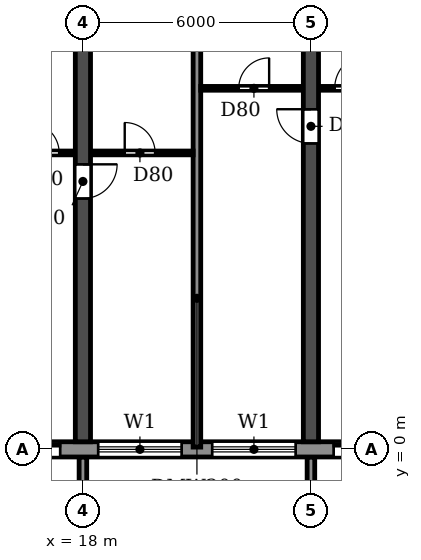
"""IFC4 building model, lengths in metres.
Left out: names, types, materials, properties, quantities, classifications, styles, units other than length and angle.
Written with IfcOpenShell. Run it as: python <this file> out.ifc"""

import sys

from ifc_helpers import new_model, si_unit, direction, frame, frame_2d, origin, place, context, subcontext, project, spatial, polyline, rectangle, outline, extrude, source, transform, mapped, element, fill, save


model = new_model("IFC4")
c1 = context("Model", 3, precision=1e-05, world=origin(), true_north=direction((0.0, 1.0)))
c2 = subcontext(c1, "Body", "Model", "MODEL_VIEW")
j1 = project(units=[si_unit("LENGTHUNIT", "METRE"), si_unit("PLANEANGLEUNIT", "RADIAN")], contexts=[c1])
p1 = place(None, origin())
s1 = spatial("IfcSite", under=j1, at=p1, CompositionType="ELEMENT")
p2 = place(p1, origin())
s2 = spatial("IfcBuilding", under=s1, at=p2, CompositionType="ELEMENT")
p3 = place(p2, frame((0.0, 0.0, 43.2)))
s3 = spatial("IfcBuildingStorey", under=s2, at=p3, CompositionType="ELEMENT", Elevation=43.2)
p4 = place(p3, frame((18.0, 0.2, 0.0), z_axis=(0.0, 0.0, 1.0), x_axis=(0.0, 1.0, 0.0)))
e1 = element("IfcWall", 1, at=p4, inside=s3, PredefinedType="SHEAR", context=c2, shape_type="SweptSolid", body=[
    extrude(rectangle(XDim=11.65, YDim=0.4, at=frame_2d((5.825, 0.0))), origin(), (0.0, 0.0, 1.0), 3.05),
])
p5 = place(p4, frame((6.4, 0.0, 0.0)))
e2 = element("IfcOpeningElement", 2, at=p5, cuts=e1, PredefinedType="OPENING", context=c2, shape_type="SweptSolid", body=[
    extrude(rectangle(XDim=0.9, YDim=2.1, at=frame_2d((0.45, 1.05))), frame((0.0, 0.21, 0.0), z_axis=(0.0, -1.0, 0.0), x_axis=(1.0, 0.0, 0.0)), (0.0, 0.0, 1.0), 0.42),
])
p6 = place(p3, frame((24.0, 0.2, 0.0), z_axis=(0.0, 0.0, 1.0), x_axis=(0.0, 1.0, 0.0)))
e3 = element("IfcWall", 3, at=p6, inside=s3, PredefinedType="SHEAR", context=c2, shape_type="SweptSolid", body=[
    extrude(rectangle(XDim=11.65, YDim=0.4, at=frame_2d((5.825, 0.0))), origin(), (0.0, 0.0, 1.0), 3.05),
])
p7 = place(p6, frame((7.85, 0.0, 0.0)))
e4 = element("IfcOpeningElement", 4, at=p7, cuts=e3, PredefinedType="OPENING", context=c2, shape_type="SweptSolid", body=[
    extrude(rectangle(XDim=0.9, YDim=2.1, at=frame_2d((0.45, 1.05))), frame((0.0, 0.21, 0.0), z_axis=(0.0, -1.0, 0.0), x_axis=(1.0, 0.0, 0.0)), (0.0, 0.0, 1.0), 0.42),
])
p8 = place(p3, frame((4.683, 0.0, 0.0), z_axis=(0.0, 0.0, 1.0), x_axis=(1.0, 0.0, 0.0)))
e5 = element("IfcWall", 5, at=p8, inside=s3, PredefinedType="STANDARD", context=c2, shape_type="SweptSolid", body=[
    extrude(rectangle(XDim=92.634, YDim=0.4, at=frame_2d((46.317, 0.0))), origin(), (0.0, 0.0, 1.0), 3.05),
])
p9 = place(p8, frame((1.717, 0.0, 0.9)))
e6 = element("IfcOpeningElement", 6, at=p9, cuts=e5, PredefinedType="OPENING", context=c2, shape_type="SweptSolid", body=[
    extrude(rectangle(XDim=2.2, YDim=1.5, at=frame_2d((1.1, 0.75))), frame((0.0, 0.21, 0.0), z_axis=(0.0, -1.0, 0.0), x_axis=(1.0, 0.0, 0.0)), (0.0, 0.0, 1.0), 0.42),
])
p10 = place(p8, frame((4.717, 0.0, 0.9)))
e7 = element("IfcOpeningElement", 7, at=p10, cuts=e5, PredefinedType="OPENING", context=c2, shape_type="SweptSolid", body=[
    extrude(rectangle(XDim=2.2, YDim=1.5, at=frame_2d((1.1, 0.75))), frame((0.0, 0.21, 0.0), z_axis=(0.0, -1.0, 0.0), x_axis=(1.0, 0.0, 0.0)), (0.0, 0.0, 1.0), 0.42),
])
p11 = place(p8, frame((7.717, 0.0, 0.9)))
e8 = element("IfcOpeningElement", 8, at=p11, cuts=e5, PredefinedType="OPENING", context=c2, shape_type="SweptSolid", body=[
    extrude(rectangle(XDim=2.2, YDim=1.5, at=frame_2d((1.1, 0.75))), frame((0.0, 0.21, 0.0), z_axis=(0.0, -1.0, 0.0), x_axis=(1.0, 0.0, 0.0)), (0.0, 0.0, 1.0), 0.42),
])
p12 = place(p8, frame((10.917, 0.0, 0.0)))
e9 = element("IfcOpeningElement", 9, at=p12, cuts=e5, PredefinedType="OPENING", context=c2, shape_type="SweptSolid", body=[
    extrude(rectangle(XDim=1.8, YDim=2.4, at=frame_2d((0.9, 1.2))), frame((0.0, 0.21, 0.0), z_axis=(0.0, -1.0, 0.0), x_axis=(1.0, 0.0, 0.0)), (0.0, 0.0, 1.0), 0.42),
])
p13 = place(p8, frame((13.717, 0.0, 0.9)))
e10 = element("IfcOpeningElement", 10, at=p13, cuts=e5, PredefinedType="OPENING", context=c2, shape_type="SweptSolid", body=[
    extrude(rectangle(XDim=2.2, YDim=1.5, at=frame_2d((1.1, 0.75))), frame((0.0, 0.21, 0.0), z_axis=(0.0, -1.0, 0.0), x_axis=(1.0, 0.0, 0.0)), (0.0, 0.0, 1.0), 0.42),
])
p14 = place(p8, frame((16.717, 0.0, 0.9)))
e11 = element("IfcOpeningElement", 11, at=p14, cuts=e5, PredefinedType="OPENING", context=c2, shape_type="SweptSolid", body=[
    extrude(rectangle(XDim=2.2, YDim=1.5, at=frame_2d((1.1, 0.75))), frame((0.0, 0.21, 0.0), z_axis=(0.0, -1.0, 0.0), x_axis=(1.0, 0.0, 0.0)), (0.0, 0.0, 1.0), 0.42),
])
p15 = place(p8, frame((19.917, 0.0, 0.0)))
e12 = element("IfcOpeningElement", 12, at=p15, cuts=e5, PredefinedType="OPENING", context=c2, shape_type="SweptSolid", body=[
    extrude(rectangle(XDim=1.8, YDim=2.4, at=frame_2d((0.9, 1.2))), frame((0.0, 0.21, 0.0), z_axis=(0.0, -1.0, 0.0), x_axis=(1.0, 0.0, 0.0)), (0.0, 0.0, 1.0), 0.42),
])
p16 = place(p8, frame((22.717, 0.0, 0.9)))
e13 = element("IfcOpeningElement", 13, at=p16, cuts=e5, PredefinedType="OPENING", context=c2, shape_type="SweptSolid", body=[
    extrude(rectangle(XDim=2.2, YDim=1.5, at=frame_2d((1.1, 0.75))), frame((0.0, 0.21, 0.0), z_axis=(0.0, -1.0, 0.0), x_axis=(1.0, 0.0, 0.0)), (0.0, 0.0, 1.0), 0.42),
])
p17 = place(p8, frame((25.717, 0.0, 0.9)))
e14 = element("IfcOpeningElement", 14, at=p17, cuts=e5, PredefinedType="OPENING", context=c2, shape_type="SweptSolid", body=[
    extrude(rectangle(XDim=2.2, YDim=1.5, at=frame_2d((1.1, 0.75))), frame((0.0, 0.21, 0.0), z_axis=(0.0, -1.0, 0.0), x_axis=(1.0, 0.0, 0.0)), (0.0, 0.0, 1.0), 0.42),
])
p18 = place(p8, frame((28.717, 0.0, 0.9)))
e15 = element("IfcOpeningElement", 15, at=p18, cuts=e5, PredefinedType="OPENING", context=c2, shape_type="SweptSolid", body=[
    extrude(rectangle(XDim=2.2, YDim=1.5, at=frame_2d((1.1, 0.75))), frame((0.0, 0.21, 0.0), z_axis=(0.0, -1.0, 0.0), x_axis=(1.0, 0.0, 0.0)), (0.0, 0.0, 1.0), 0.42),
])
p19 = place(p8, frame((31.717, 0.0, 0.9)))
e16 = element("IfcOpeningElement", 16, at=p19, cuts=e5, PredefinedType="OPENING", context=c2, shape_type="SweptSolid", body=[
    extrude(rectangle(XDim=2.2, YDim=1.5, at=frame_2d((1.1, 0.75))), frame((0.0, 0.21, 0.0), z_axis=(0.0, -1.0, 0.0), x_axis=(1.0, 0.0, 0.0)), (0.0, 0.0, 1.0), 0.42),
])
p20 = place(p8, frame((34.917, 0.0, 0.0)))
e17 = element("IfcOpeningElement", 17, at=p20, cuts=e5, PredefinedType="OPENING", context=c2, shape_type="SweptSolid", body=[
    extrude(rectangle(XDim=1.8, YDim=2.4, at=frame_2d((0.9, 1.2))), frame((0.0, 0.21, 0.0), z_axis=(0.0, -1.0, 0.0), x_axis=(1.0, 0.0, 0.0)), (0.0, 0.0, 1.0), 0.42),
])
p21 = place(p8, frame((37.717, 0.0, 0.9)))
e18 = element("IfcOpeningElement", 18, at=p21, cuts=e5, PredefinedType="OPENING", context=c2, shape_type="SweptSolid", body=[
    extrude(rectangle(XDim=2.2, YDim=1.5, at=frame_2d((1.1, 0.75))), frame((0.0, 0.21, 0.0), z_axis=(0.0, -1.0, 0.0), x_axis=(1.0, 0.0, 0.0)), (0.0, 0.0, 1.0), 0.42),
])
p22 = place(p8, frame((40.717, 0.0, 0.9)))
e19 = element("IfcOpeningElement", 19, at=p22, cuts=e5, PredefinedType="OPENING", context=c2, shape_type="SweptSolid", body=[
    extrude(rectangle(XDim=2.2, YDim=1.5, at=frame_2d((1.1, 0.75))), frame((0.0, 0.21, 0.0), z_axis=(0.0, -1.0, 0.0), x_axis=(1.0, 0.0, 0.0)), (0.0, 0.0, 1.0), 0.42),
])
p23 = place(p8, frame((43.717, 0.0, 0.9)))
e20 = element("IfcOpeningElement", 20, at=p23, cuts=e5, PredefinedType="OPENING", context=c2, shape_type="SweptSolid", body=[
    extrude(rectangle(XDim=2.2, YDim=1.5, at=frame_2d((1.1, 0.75))), frame((0.0, 0.21, 0.0), z_axis=(0.0, -1.0, 0.0), x_axis=(1.0, 0.0, 0.0)), (0.0, 0.0, 1.0), 0.42),
])
p24 = place(p8, frame((46.917, 0.0, 0.0)))
e21 = element("IfcOpeningElement", 21, at=p24, cuts=e5, PredefinedType="OPENING", context=c2, shape_type="SweptSolid", body=[
    extrude(rectangle(XDim=1.8, YDim=2.4, at=frame_2d((0.9, 1.2))), frame((0.0, 0.21, 0.0), z_axis=(0.0, -1.0, 0.0), x_axis=(1.0, 0.0, 0.0)), (0.0, 0.0, 1.0), 0.42),
])
p25 = place(p8, frame((49.717, 0.0, 0.9)))
e22 = element("IfcOpeningElement", 22, at=p25, cuts=e5, PredefinedType="OPENING", context=c2, shape_type="SweptSolid", body=[
    extrude(rectangle(XDim=2.2, YDim=1.5, at=frame_2d((1.1, 0.75))), frame((0.0, 0.21, 0.0), z_axis=(0.0, -1.0, 0.0), x_axis=(1.0, 0.0, 0.0)), (0.0, 0.0, 1.0), 0.42),
])
p26 = place(p8, frame((52.717, 0.0, 0.9)))
e23 = element("IfcOpeningElement", 23, at=p26, cuts=e5, PredefinedType="OPENING", context=c2, shape_type="SweptSolid", body=[
    extrude(rectangle(XDim=2.2, YDim=1.5, at=frame_2d((1.1, 0.75))), frame((0.0, 0.21, 0.0), z_axis=(0.0, -1.0, 0.0), x_axis=(1.0, 0.0, 0.0)), (0.0, 0.0, 1.0), 0.42),
])
p27 = place(p8, frame((55.717, 0.0, 0.9)))
e24 = element("IfcOpeningElement", 24, at=p27, cuts=e5, PredefinedType="OPENING", context=c2, shape_type="SweptSolid", body=[
    extrude(rectangle(XDim=2.2, YDim=1.5, at=frame_2d((1.1, 0.75))), frame((0.0, 0.21, 0.0), z_axis=(0.0, -1.0, 0.0), x_axis=(1.0, 0.0, 0.0)), (0.0, 0.0, 1.0), 0.42),
])
p28 = place(p8, frame((58.917, 0.0, 0.0)))
e25 = element("IfcOpeningElement", 25, at=p28, cuts=e5, PredefinedType="OPENING", context=c2, shape_type="SweptSolid", body=[
    extrude(rectangle(XDim=1.8, YDim=2.4, at=frame_2d((0.9, 1.2))), frame((0.0, 0.21, 0.0), z_axis=(0.0, -1.0, 0.0), x_axis=(1.0, 0.0, 0.0)), (0.0, 0.0, 1.0), 0.42),
])
p29 = place(p8, frame((61.717, 0.0, 0.9)))
e26 = element("IfcOpeningElement", 26, at=p29, cuts=e5, PredefinedType="OPENING", context=c2, shape_type="SweptSolid", body=[
    extrude(rectangle(XDim=2.2, YDim=1.5, at=frame_2d((1.1, 0.75))), frame((0.0, 0.21, 0.0), z_axis=(0.0, -1.0, 0.0), x_axis=(1.0, 0.0, 0.0)), (0.0, 0.0, 1.0), 0.42),
])
p30 = place(p8, frame((64.717, 0.0, 0.9)))
e27 = element("IfcOpeningElement", 27, at=p30, cuts=e5, PredefinedType="OPENING", context=c2, shape_type="SweptSolid", body=[
    extrude(rectangle(XDim=2.2, YDim=1.5, at=frame_2d((1.1, 0.75))), frame((0.0, 0.21, 0.0), z_axis=(0.0, -1.0, 0.0), x_axis=(1.0, 0.0, 0.0)), (0.0, 0.0, 1.0), 0.42),
])
p31 = place(p8, frame((67.717, 0.0, 0.9)))
e28 = element("IfcOpeningElement", 28, at=p31, cuts=e5, PredefinedType="OPENING", context=c2, shape_type="SweptSolid", body=[
    extrude(rectangle(XDim=2.2, YDim=1.5, at=frame_2d((1.1, 0.75))), frame((0.0, 0.21, 0.0), z_axis=(0.0, -1.0, 0.0), x_axis=(1.0, 0.0, 0.0)), (0.0, 0.0, 1.0), 0.42),
])
p32 = place(p8, frame((70.917, 0.0, 0.0)))
e29 = element("IfcOpeningElement", 29, at=p32, cuts=e5, PredefinedType="OPENING", context=c2, shape_type="SweptSolid", body=[
    extrude(rectangle(XDim=1.8, YDim=2.4, at=frame_2d((0.9, 1.2))), frame((0.0, 0.21, 0.0), z_axis=(0.0, -1.0, 0.0), x_axis=(1.0, 0.0, 0.0)), (0.0, 0.0, 1.0), 0.42),
])
p33 = place(p8, frame((73.717, 0.0, 0.9)))
e30 = element("IfcOpeningElement", 30, at=p33, cuts=e5, PredefinedType="OPENING", context=c2, shape_type="SweptSolid", body=[
    extrude(rectangle(XDim=2.2, YDim=1.5, at=frame_2d((1.1, 0.75))), frame((0.0, 0.21, 0.0), z_axis=(0.0, -1.0, 0.0), x_axis=(1.0, 0.0, 0.0)), (0.0, 0.0, 1.0), 0.42),
])
p34 = place(p8, frame((76.717, 0.0, 0.9)))
e31 = element("IfcOpeningElement", 31, at=p34, cuts=e5, PredefinedType="OPENING", context=c2, shape_type="SweptSolid", body=[
    extrude(rectangle(XDim=2.2, YDim=1.5, at=frame_2d((1.1, 0.75))), frame((0.0, 0.21, 0.0), z_axis=(0.0, -1.0, 0.0), x_axis=(1.0, 0.0, 0.0)), (0.0, 0.0, 1.0), 0.42),
])
p35 = place(p8, frame((79.717, 0.0, 0.9)))
e32 = element("IfcOpeningElement", 32, at=p35, cuts=e5, PredefinedType="OPENING", context=c2, shape_type="SweptSolid", body=[
    extrude(rectangle(XDim=2.2, YDim=1.5, at=frame_2d((1.1, 0.75))), frame((0.0, 0.21, 0.0), z_axis=(0.0, -1.0, 0.0), x_axis=(1.0, 0.0, 0.0)), (0.0, 0.0, 1.0), 0.42),
])
p36 = place(p8, frame((82.917, 0.0, 0.0)))
e33 = element("IfcOpeningElement", 33, at=p36, cuts=e5, PredefinedType="OPENING", context=c2, shape_type="SweptSolid", body=[
    extrude(rectangle(XDim=1.8, YDim=2.4, at=frame_2d((0.9, 1.2))), frame((0.0, 0.21, 0.0), z_axis=(0.0, -1.0, 0.0), x_axis=(1.0, 0.0, 0.0)), (0.0, 0.0, 1.0), 0.42),
])
p37 = place(p8, frame((85.717, 0.0, 0.9)))
e34 = element("IfcOpeningElement", 34, at=p37, cuts=e5, PredefinedType="OPENING", context=c2, shape_type="SweptSolid", body=[
    extrude(rectangle(XDim=2.2, YDim=1.5, at=frame_2d((1.1, 0.75))), frame((0.0, 0.21, 0.0), z_axis=(0.0, -1.0, 0.0), x_axis=(1.0, 0.0, 0.0)), (0.0, 0.0, 1.0), 0.42),
])
p38 = place(p8, frame((88.717, 0.0, 0.9)))
e35 = element("IfcOpeningElement", 35, at=p38, cuts=e5, PredefinedType="OPENING", context=c2, shape_type="SweptSolid", body=[
    extrude(rectangle(XDim=2.2, YDim=1.5, at=frame_2d((1.1, 0.75))), frame((0.0, 0.21, 0.0), z_axis=(0.0, -1.0, 0.0), x_axis=(1.0, 0.0, 0.0)), (0.0, 0.0, 1.0), 0.42),
])
m1 = source(origin(), c2, "Body", "SweptSolid", [
    extrude(outline(polyline([(0.0, 0.0), (0.2, 0.0), (0.2, 1.65), (0.0, 1.65), (0.0, 0.0)])), origin(), (0.0, 0.0, 1.0), 3.1),
])
for number, where in (
    (36, (17.9, -1.85, 0.0)),
    (37, (23.9, -1.85, 0.0)),
):
    element("IfcWall", number, at=place(p3, frame(where)), inside=s3, PredefinedType="STANDARD", context=c2, shape_type="MappedRepresentation", body=[
        mapped(m1, transform((0.0, 0.0, 0.0))),
    ])
p39 = place(p3, frame((21.0, 0.06, 0.0), z_axis=(0.0, 0.0, 1.0), x_axis=(0.0, 1.0, 0.0)))
e38 = element("IfcWall", 38, at=p39, inside=s3, PredefinedType="PARTITIONING", context=c2, shape_type="SweptSolid", body=[
    extrude(rectangle(XDim=11.78, YDim=0.2, at=frame_2d((5.89, 0.0))), origin(), (0.0, 0.0, 1.0), 3.05),
])
p40 = place(p3, frame((15.9, 7.8, 0.0), z_axis=(0.0, 0.0, 1.0), x_axis=(1.0, 0.0, 0.0)))
e39 = element("IfcWall", 39, at=p40, inside=s3, PredefinedType="PARTITIONING", context=c2, shape_type="SweptSolid", body=[
    extrude(rectangle(XDim=1.89, YDim=0.1, at=frame_2d((0.945, 0.0))), origin(), (0.0, 0.0, 1.0), 3.05),
])
p41 = place(p40, frame((0.675, 0.0, 0.0)))
e40 = element("IfcOpeningElement", 40, at=p41, cuts=e39, PredefinedType="OPENING", context=c2, shape_type="SweptSolid", body=[
    extrude(rectangle(XDim=0.8, YDim=2.1, at=frame_2d((0.4, 1.05))), frame((0.0, 0.06, 0.0), z_axis=(0.0, -1.0, 0.0), x_axis=(1.0, 0.0, 0.0)), (0.0, 0.0, 1.0), 0.12),
])
p42 = place(p3, frame((18.21, 7.8, 0.0), z_axis=(0.0, 0.0, 1.0), x_axis=(1.0, 0.0, 0.0)))
e41 = element("IfcWall", 41, at=p42, inside=s3, PredefinedType="PARTITIONING", context=c2, shape_type="SweptSolid", body=[
    extrude(rectangle(XDim=2.69, YDim=0.1, at=frame_2d((1.345, 0.0))), origin(), (0.0, 0.0, 1.0), 3.05),
])
p43 = place(p42, frame((0.89, 0.0, 0.0)))
e42 = element("IfcOpeningElement", 42, at=p43, cuts=e41, PredefinedType="OPENING", context=c2, shape_type="SweptSolid", body=[
    extrude(rectangle(XDim=0.8, YDim=2.1, at=frame_2d((0.4, 1.05))), frame((0.0, 0.06, 0.0), z_axis=(0.0, -1.0, 0.0), x_axis=(1.0, 0.0, 0.0)), (0.0, 0.0, 1.0), 0.12),
])
p44 = place(p3, frame((21.1, 9.5, 0.0), z_axis=(0.0, 0.0, 1.0), x_axis=(1.0, 0.0, 0.0)))
e43 = element("IfcWall", 43, at=p44, inside=s3, PredefinedType="PARTITIONING", context=c2, shape_type="SweptSolid", body=[
    extrude(rectangle(XDim=2.69, YDim=0.1, at=frame_2d((1.345, 0.0))), origin(), (0.0, 0.0, 1.0), 3.05),
])
p45 = place(p44, frame((1.0, 0.0, 0.0)))
e44 = element("IfcOpeningElement", 44, at=p45, cuts=e43, PredefinedType="OPENING", context=c2, shape_type="SweptSolid", body=[
    extrude(rectangle(XDim=0.8, YDim=2.1, at=frame_2d((0.4, 1.05))), frame((0.0, 0.06, 0.0), z_axis=(0.0, -1.0, 0.0), x_axis=(1.0, 0.0, 0.0)), (0.0, 0.0, 1.0), 0.12),
])
p46 = place(p3, frame((24.21, 9.5, 0.0), z_axis=(0.0, 0.0, 1.0), x_axis=(1.0, 0.0, 0.0)))
e45 = element("IfcWall", 45, at=p46, inside=s3, PredefinedType="PARTITIONING", context=c2, shape_type="SweptSolid", body=[
    extrude(rectangle(XDim=1.99, YDim=0.1, at=frame_2d((0.995, 0.0))), origin(), (0.0, 0.0, 1.0), 3.05),
])
p47 = place(p46, frame((0.415, 0.0, 0.0)))
e46 = element("IfcOpeningElement", 46, at=p47, cuts=e45, PredefinedType="OPENING", context=c2, shape_type="SweptSolid", body=[
    extrude(rectangle(XDim=0.9, YDim=2.1, at=frame_2d((0.45, 1.05))), frame((0.0, 0.06, 0.0), z_axis=(0.0, -1.0, 0.0), x_axis=(1.0, 0.0, 0.0)), (0.0, 0.0, 1.0), 0.12),
])
p48 = place(p12, origin())
e47 = element("IfcDoor", 47, at=p48, inside=s3, OperationType="DOUBLE_DOOR_SLIDING", PredefinedType="DOOR", context=c2, shape_type="SweptSolid", body=[
    extrude(rectangle(XDim=1.8, YDim=2.4, at=frame_2d((0.9, 1.2))), frame((0.0, 0.025, 0.0), z_axis=(0.0, -1.0, 0.0), x_axis=(1.0, 0.0, 0.0)), (0.0, 0.0, 1.0), 0.05),
])
fill(e9, e47)
p49 = place(p13, origin())
e48 = element("IfcWindow", 48, at=p49, inside=s3, PartitioningType="DOUBLE_PANEL_HORIZONTAL", PredefinedType="WINDOW", context=c2, shape_type="SweptSolid", body=[
    extrude(rectangle(XDim=2.2, YDim=1.5, at=frame_2d((1.1, 0.75))), frame((0.0, 0.03, 0.0), z_axis=(0.0, -1.0, 0.0), x_axis=(1.0, 0.0, 0.0)), (0.0, 0.0, 1.0), 0.06),
])
fill(e10, e48)
p50 = place(p14, origin())
e49 = element("IfcWindow", 49, at=p50, inside=s3, PartitioningType="DOUBLE_PANEL_HORIZONTAL", PredefinedType="WINDOW", context=c2, shape_type="SweptSolid", body=[
    extrude(rectangle(XDim=2.2, YDim=1.5, at=frame_2d((1.1, 0.75))), frame((0.0, 0.03, 0.0), z_axis=(0.0, -1.0, 0.0), x_axis=(1.0, 0.0, 0.0)), (0.0, 0.0, 1.0), 0.06),
])
fill(e11, e49)
p51 = place(p15, origin())
e50 = element("IfcDoor", 50, at=p51, inside=s3, OperationType="DOUBLE_DOOR_SLIDING", PredefinedType="DOOR", context=c2, shape_type="SweptSolid", body=[
    extrude(rectangle(XDim=1.8, YDim=2.4, at=frame_2d((0.9, 1.2))), frame((0.0, 0.025, 0.0), z_axis=(0.0, -1.0, 0.0), x_axis=(1.0, 0.0, 0.0)), (0.0, 0.0, 1.0), 0.05),
])
fill(e12, e50)
p52 = place(p43, origin())
e51 = element("IfcDoor", 51, at=p52, inside=s3, OperationType="SINGLE_SWING_LEFT", PredefinedType="DOOR", context=c2, shape_type="SweptSolid", body=[
    extrude(rectangle(XDim=0.8, YDim=2.1, at=frame_2d((0.4, 1.05))), frame((0.0, 0.025, 0.0), z_axis=(0.0, -1.0, 0.0), x_axis=(1.0, 0.0, 0.0)), (0.0, 0.0, 1.0), 0.05),
])
fill(e42, e51)
p53 = place(p41, origin())
e52 = element("IfcDoor", 52, at=p53, inside=s3, OperationType="SINGLE_SWING_LEFT", PredefinedType="DOOR", context=c2, shape_type="SweptSolid", body=[
    extrude(rectangle(XDim=0.8, YDim=2.1, at=frame_2d((0.4, 1.05))), frame((0.0, 0.025, 0.0), z_axis=(0.0, -1.0, 0.0), x_axis=(1.0, 0.0, 0.0)), (0.0, 0.0, 1.0), 0.05),
])
fill(e40, e52)
p54 = place(p5, frame((0.9, 0.0, 0.0), z_axis=(0.0, 0.0, 1.0), x_axis=(-1.0, 0.0, 0.0)))
e53 = element("IfcDoor", 53, at=p54, inside=s3, OperationType="SINGLE_SWING_LEFT", PredefinedType="DOOR", context=c2, shape_type="SweptSolid", body=[
    extrude(rectangle(XDim=0.9, YDim=2.1, at=frame_2d((0.45, 1.05))), frame((0.0, 0.025, 0.0), z_axis=(0.0, -1.0, 0.0), x_axis=(1.0, 0.0, 0.0)), (0.0, 0.0, 1.0), 0.05),
])
fill(e2, e53)
p55 = place(p45, origin())
e54 = element("IfcDoor", 54, at=p55, inside=s3, OperationType="SINGLE_SWING_RIGHT", PredefinedType="DOOR", context=c2, shape_type="SweptSolid", body=[
    extrude(rectangle(XDim=0.8, YDim=2.1, at=frame_2d((0.4, 1.05))), frame((0.0, 0.025, 0.0), z_axis=(0.0, -1.0, 0.0), x_axis=(1.0, 0.0, 0.0)), (0.0, 0.0, 1.0), 0.05),
])
fill(e44, e54)
p56 = place(p7, origin())
e55 = element("IfcDoor", 55, at=p56, inside=s3, OperationType="SINGLE_SWING_RIGHT", PredefinedType="DOOR", context=c2, shape_type="SweptSolid", body=[
    extrude(rectangle(XDim=0.9, YDim=2.1, at=frame_2d((0.45, 1.05))), frame((0.0, 0.025, 0.0), z_axis=(0.0, -1.0, 0.0), x_axis=(1.0, 0.0, 0.0)), (0.0, 0.0, 1.0), 0.05),
])
fill(e4, e55)
p57 = place(p47, origin())
e56 = element("IfcDoor", 56, at=p57, inside=s3, OperationType="SINGLE_SWING_RIGHT", PredefinedType="DOOR", context=c2, shape_type="SweptSolid", body=[
    extrude(rectangle(XDim=0.9, YDim=2.1, at=frame_2d((0.45, 1.05))), frame((0.0, 0.025, 0.0), z_axis=(0.0, -1.0, 0.0), x_axis=(1.0, 0.0, 0.0)), (0.0, 0.0, 1.0), 0.05),
])
fill(e46, e56)
save(model, sys.argv[1])
